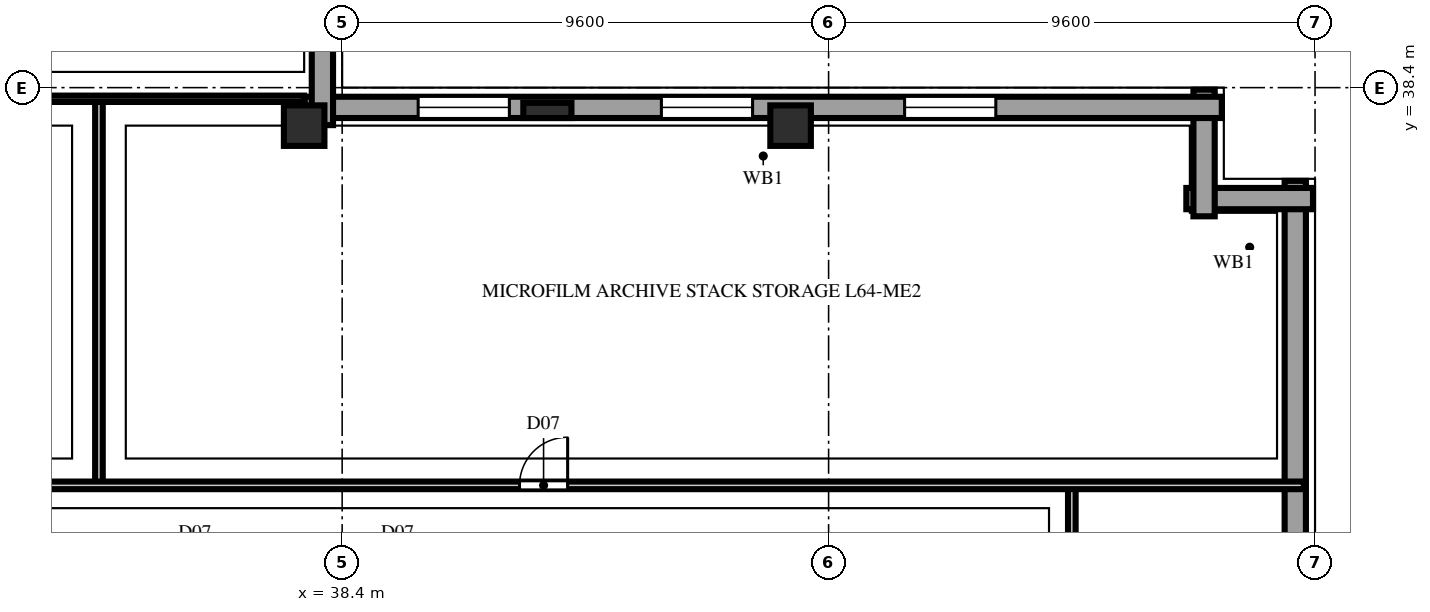
"""IFC4 building model, lengths in metres.
Left out: names, types, materials, properties, quantities, classifications, styles, units other than length and angle.
Written with IfcOpenShell. Run it as: python <this file> out.ifc"""

import sys

from ifc_helpers import new_model, si_unit, direction, frame, frame_2d, origin, origin_2d, place, context, subcontext, project, spatial, rectangle, extrude, element, fill, save


model = new_model("IFC4")
c1 = context("Model", 3, precision=1e-05, world=origin(), true_north=direction((0.0, 1.0)))
c2 = subcontext(c1, "Body", "Model", "MODEL_VIEW")
j1 = project(units=[si_unit("LENGTHUNIT", "METRE"), si_unit("PLANEANGLEUNIT", "RADIAN")], contexts=[c1])
p1 = place(None, origin())
s1 = spatial("IfcSite", under=j1, at=p1, CompositionType="ELEMENT")
p2 = place(p1, origin())
s2 = spatial("IfcBuilding", under=s1, at=p2, CompositionType="ELEMENT")
p3 = place(p2, frame((0.0, 0.0, 252.2)))
s3 = spatial("IfcBuildingStorey", under=s2, at=p3, CompositionType="ELEMENT", Elevation=252.2)
for number, where, z_axis, x_axis in (
    (1, (37.65, 37.65, 0.0), (0.0, 0.0, 1.0), (1.0, 0.0, 0.0)),
    (2, (47.25, 37.65, 0.0), (0.0, 0.0, 1.0), (1.0, 0.0, 0.0)),
):
    element("IfcColumn", number, at=place(p3, frame(where, z_axis=z_axis, x_axis=x_axis)), inside=s3, PredefinedType="COLUMN", context=c2, shape_type="SweptSolid", body=[
        extrude(rectangle(XDim=0.8, YDim=0.8, at=origin_2d()), origin(), (0.0, 0.0, 1.0), 3.8),
    ])
p4 = place(p3, frame((42.45, 37.95, 0.0), z_axis=(0.0, 0.0, 1.0), x_axis=(1.0, 0.0, 0.0)))
e3 = element("IfcColumn", 3, at=p4, inside=s3, PredefinedType="PILASTER", context=c2, shape_type="SweptSolid", body=[
    extrude(rectangle(XDim=0.95, YDim=0.3, at=origin_2d()), origin(), (0.0, 0.0, 1.0), 3.8),
])
p5 = place(p3, frame((57.21, 1.84, 0.0), z_axis=(0.0, 0.0, 1.0), x_axis=(0.0, 1.0, 0.0)))
e4 = element("IfcWall", 4, at=p5, inside=s3, PredefinedType="SOLIDWALL", context=c2, shape_type="SweptSolid", body=[
    extrude(rectangle(XDim=34.72, YDim=0.42, at=frame_2d((17.36, 0.0))), origin(), (0.0, 0.0, 1.0), 3.48),
])
p6 = place(p5, frame((4.61, 0.0, 0.85)))
e5 = element("IfcOpeningElement", 5, at=p6, cuts=e4, PredefinedType="OPENING", context=c2, shape_type="SweptSolid", body=[
    extrude(rectangle(XDim=1.5, YDim=1.85, at=frame_2d((0.75, 0.925))), frame((0.0, 0.222, 0.0), z_axis=(0.0, -1.0, 0.0), x_axis=(1.0, 0.0, 0.0)), (0.0, 0.0, 1.0), 0.444),
])
p7 = place(p5, frame((9.41, 0.0, 0.85)))
e6 = element("IfcOpeningElement", 6, at=p7, cuts=e4, PredefinedType="OPENING", context=c2, shape_type="SweptSolid", body=[
    extrude(rectangle(XDim=1.5, YDim=1.85, at=frame_2d((0.75, 0.925))), frame((0.0, 0.222, 0.0), z_axis=(0.0, -1.0, 0.0), x_axis=(1.0, 0.0, 0.0)), (0.0, 0.0, 1.0), 0.444),
])
p8 = place(p5, frame((14.21, 0.0, 0.85)))
e7 = element("IfcOpeningElement", 7, at=p8, cuts=e4, PredefinedType="OPENING", context=c2, shape_type="SweptSolid", body=[
    extrude(rectangle(XDim=1.5, YDim=1.85, at=frame_2d((0.75, 0.925))), frame((0.0, 0.222, 0.0), z_axis=(0.0, -1.0, 0.0), x_axis=(1.0, 0.0, 0.0)), (0.0, 0.0, 1.0), 0.444),
])
p9 = place(p5, frame((19.01, 0.0, 0.85)))
e8 = element("IfcOpeningElement", 8, at=p9, cuts=e4, PredefinedType="OPENING", context=c2, shape_type="SweptSolid", body=[
    extrude(rectangle(XDim=1.5, YDim=1.85, at=frame_2d((0.75, 0.925))), frame((0.0, 0.222, 0.0), z_axis=(0.0, -1.0, 0.0), x_axis=(1.0, 0.0, 0.0)), (0.0, 0.0, 1.0), 0.444),
])
p10 = place(p5, frame((23.81, 0.0, 0.85)))
e9 = element("IfcOpeningElement", 9, at=p10, cuts=e4, PredefinedType="OPENING", context=c2, shape_type="SweptSolid", body=[
    extrude(rectangle(XDim=1.5, YDim=1.85, at=frame_2d((0.75, 0.925))), frame((0.0, 0.222, 0.0), z_axis=(0.0, -1.0, 0.0), x_axis=(1.0, 0.0, 0.0)), (0.0, 0.0, 1.0), 0.444),
])
for number, where, z_axis, x_axis in (
    (10, (57.56, 36.21, 0.0), (0.0, 0.0, 1.0), (-1.0, 0.0, 0.0)),
    (11, (55.41, 35.86, 0.0), (0.0, 0.0, 1.0), (0.0, 1.0, 0.0)),
):
    element("IfcWall", number, at=place(p3, frame(where, z_axis=z_axis, x_axis=x_axis)), inside=s3, PredefinedType="SOLIDWALL", context=c2, shape_type="SweptSolid", body=[
        extrude(rectangle(XDim=2.5, YDim=0.42, at=frame_2d((1.25, 0.0))), origin(), (0.0, 0.0, 1.0), 3.48),
    ])
p11 = place(p3, frame((55.76, 38.01, 0.0), z_axis=(0.0, 0.0, 1.0), x_axis=(-1.0, 0.0, 0.0)))
e12 = element("IfcWall", 12, at=p11, inside=s3, PredefinedType="SOLIDWALL", context=c2, shape_type="SweptSolid", body=[
    extrude(rectangle(XDim=18.1, YDim=0.42, at=frame_2d((9.05, 0.0))), origin(), (0.0, 0.0, 1.0), 3.48),
])
p12 = place(p11, frame((4.46, 0.0, 0.85)))
e13 = element("IfcOpeningElement", 13, at=p12, cuts=e12, PredefinedType="OPENING", context=c2, shape_type="SweptSolid", body=[
    extrude(rectangle(XDim=1.8, YDim=1.85, at=frame_2d((0.9, 0.925))), frame((0.0, 0.222, 0.0), z_axis=(0.0, -1.0, 0.0), x_axis=(1.0, 0.0, 0.0)), (0.0, 0.0, 1.0), 0.444),
])
p13 = place(p11, frame((9.26, 0.0, 0.85)))
e14 = element("IfcOpeningElement", 14, at=p13, cuts=e12, PredefinedType="OPENING", context=c2, shape_type="SweptSolid", body=[
    extrude(rectangle(XDim=1.8, YDim=1.85, at=frame_2d((0.9, 0.925))), frame((0.0, 0.222, 0.0), z_axis=(0.0, -1.0, 0.0), x_axis=(1.0, 0.0, 0.0)), (0.0, 0.0, 1.0), 0.444),
])
p14 = place(p11, frame((14.06, 0.0, 0.85)))
e15 = element("IfcOpeningElement", 15, at=p14, cuts=e12, PredefinedType="OPENING", context=c2, shape_type="SweptSolid", body=[
    extrude(rectangle(XDim=1.8, YDim=1.85, at=frame_2d((0.9, 0.925))), frame((0.0, 0.222, 0.0), z_axis=(0.0, -1.0, 0.0), x_axis=(1.0, 0.0, 0.0)), (0.0, 0.0, 1.0), 0.444),
])
p15 = place(p3, frame((38.01, 37.66, 0.0), z_axis=(0.0, 0.0, 1.0), x_axis=(0.0, 1.0, 0.0)))
e16 = element("IfcWall", 16, at=p15, inside=s3, PredefinedType="SOLIDWALL", context=c2, shape_type="SweptSolid", body=[
    extrude(rectangle(XDim=18.1, YDim=0.42, at=frame_2d((9.05, 0.0))), origin(), (0.0, 0.0, 1.0), 3.48),
])
p16 = place(p15, frame((2.24, 0.0, 0.85)))
e17 = element("IfcOpeningElement", 17, at=p16, cuts=e16, PredefinedType="OPENING", context=c2, shape_type="SweptSolid", body=[
    extrude(rectangle(XDim=1.8, YDim=1.85, at=frame_2d((0.9, 0.925))), frame((0.0, 0.222, 0.0), z_axis=(0.0, -1.0, 0.0), x_axis=(1.0, 0.0, 0.0)), (0.0, 0.0, 1.0), 0.444),
])
p17 = place(p15, frame((7.04, 0.0, 0.85)))
e18 = element("IfcOpeningElement", 18, at=p17, cuts=e16, PredefinedType="OPENING", context=c2, shape_type="SweptSolid", body=[
    extrude(rectangle(XDim=1.8, YDim=1.85, at=frame_2d((0.9, 0.925))), frame((0.0, 0.222, 0.0), z_axis=(0.0, -1.0, 0.0), x_axis=(1.0, 0.0, 0.0)), (0.0, 0.0, 1.0), 0.444),
])
p18 = place(p15, frame((11.84, 0.0, 0.85)))
e19 = element("IfcOpeningElement", 19, at=p18, cuts=e16, PredefinedType="OPENING", context=c2, shape_type="SweptSolid", body=[
    extrude(rectangle(XDim=1.8, YDim=1.85, at=frame_2d((0.9, 0.925))), frame((0.0, 0.222, 0.0), z_axis=(0.0, -1.0, 0.0), x_axis=(1.0, 0.0, 0.0)), (0.0, 0.0, 1.0), 0.444),
])
p19 = place(p3, frame((52.8, 28.4, 0.0), z_axis=(0.0, 0.0, 1.0), x_axis=(0.0, 1.0, 0.0)))
e20 = element("IfcWall", 20, at=p19, inside=s3, PredefinedType="PARTITIONING", context=c2, shape_type="SweptSolid", body=[
    extrude(rectangle(XDim=2.15, YDim=0.15, at=frame_2d((1.075, 0.0))), origin(), (0.0, 0.0, 1.0), 3.48),
])
p20 = place(p3, frame((33.6, 30.55, 0.0), z_axis=(0.0, 0.0, 1.0), x_axis=(0.0, 1.0, 0.0)))
e21 = element("IfcWall", 21, at=p20, inside=s3, PredefinedType="PARTITIONING", context=c2, shape_type="SweptSolid", body=[
    extrude(rectangle(XDim=7.63, YDim=0.15, at=frame_2d((3.815, 0.0))), origin(), (0.0, 0.0, 1.0), 3.48),
])
p21 = place(p3, frame((19.2, 30.55, 0.0), z_axis=(0.0, 0.0, 1.0), x_axis=(1.0, 0.0, 0.0)))
e22 = element("IfcWall", 22, at=p21, inside=s3, PredefinedType="PARTITIONING", context=c2, shape_type="SweptSolid", body=[
    extrude(rectangle(XDim=38.18, YDim=0.15, at=frame_2d((19.09, 0.0))), origin(), (0.0, 0.0, 1.0), 3.48),
])
p22 = place(p21, frame((4.3, 0.0, 0.0)))
e23 = element("IfcOpeningElement", 23, at=p22, cuts=e22, PredefinedType="OPENING", context=c2, shape_type="SweptSolid", body=[
    extrude(rectangle(XDim=0.95, YDim=2.15, at=frame_2d((0.475, 1.075))), frame((0.0, 0.087, 0.0), z_axis=(0.0, -1.0, 0.0), x_axis=(1.0, 0.0, 0.0)), (0.0, 0.0, 1.0), 0.174),
])
p23 = place(p21, frame((22.7, 0.0, 0.0)))
e24 = element("IfcOpeningElement", 24, at=p23, cuts=e22, PredefinedType="OPENING", context=c2, shape_type="SweptSolid", body=[
    extrude(rectangle(XDim=0.95, YDim=2.15, at=frame_2d((0.475, 1.075))), frame((0.0, 0.087, 0.0), z_axis=(0.0, -1.0, 0.0), x_axis=(1.0, 0.0, 0.0)), (0.0, 0.0, 1.0), 0.174),
])
p24 = place(p3, frame((19.28, 38.18, 0.0), z_axis=(0.0, 0.0, 1.0), x_axis=(1.0, 0.0, 0.0)))
e25 = element("IfcWall", 25, at=p24, inside=s3, PredefinedType="PARTITIONING", context=c2, shape_type="SweptSolid", body=[
    extrude(rectangle(XDim=18.37, YDim=0.125, at=frame_2d((9.185, 0.0))), origin(), (0.0, 0.0, 1.0), 3.48),
])
p25 = place(p12, origin())
e26 = element("IfcWindow", 26, at=p25, inside=s3, PartitioningType="DOUBLE_PANEL_VERTICAL", PredefinedType="WINDOW", context=c2, shape_type="SweptSolid", body=[
    extrude(rectangle(XDim=1.8, YDim=1.85, at=frame_2d((0.9, 0.925))), frame((0.0, 0.11, 0.0), z_axis=(0.0, -1.0, 0.0), x_axis=(1.0, 0.0, 0.0)), (0.0, 0.0, 1.0), 0.06),
])
fill(e13, e26)
p26 = place(p13, origin())
e27 = element("IfcWindow", 27, at=p26, inside=s3, PartitioningType="DOUBLE_PANEL_VERTICAL", PredefinedType="WINDOW", context=c2, shape_type="SweptSolid", body=[
    extrude(rectangle(XDim=1.8, YDim=1.85, at=frame_2d((0.9, 0.925))), frame((0.0, 0.11, 0.0), z_axis=(0.0, -1.0, 0.0), x_axis=(1.0, 0.0, 0.0)), (0.0, 0.0, 1.0), 0.06),
])
fill(e14, e27)
p27 = place(p14, origin())
e28 = element("IfcWindow", 28, at=p27, inside=s3, PartitioningType="DOUBLE_PANEL_VERTICAL", PredefinedType="WINDOW", context=c2, shape_type="SweptSolid", body=[
    extrude(rectangle(XDim=1.8, YDim=1.85, at=frame_2d((0.9, 0.925))), frame((0.0, 0.11, 0.0), z_axis=(0.0, -1.0, 0.0), x_axis=(1.0, 0.0, 0.0)), (0.0, 0.0, 1.0), 0.06),
])
fill(e15, e28)
p28 = place(p23, origin())
e29 = element("IfcDoor", 29, at=p28, inside=s3, OperationType="SINGLE_SWING_RIGHT", PredefinedType="DOOR", context=c2, shape_type="SweptSolid", body=[
    extrude(rectangle(XDim=0.95, YDim=2.15, at=frame_2d((0.475, 1.075))), frame((0.0, 0.025, 0.0), z_axis=(0.0, -1.0, 0.0), x_axis=(1.0, 0.0, 0.0)), (0.0, 0.0, 1.0), 0.05),
])
fill(e24, e29)
save(model, sys.argv[1])
